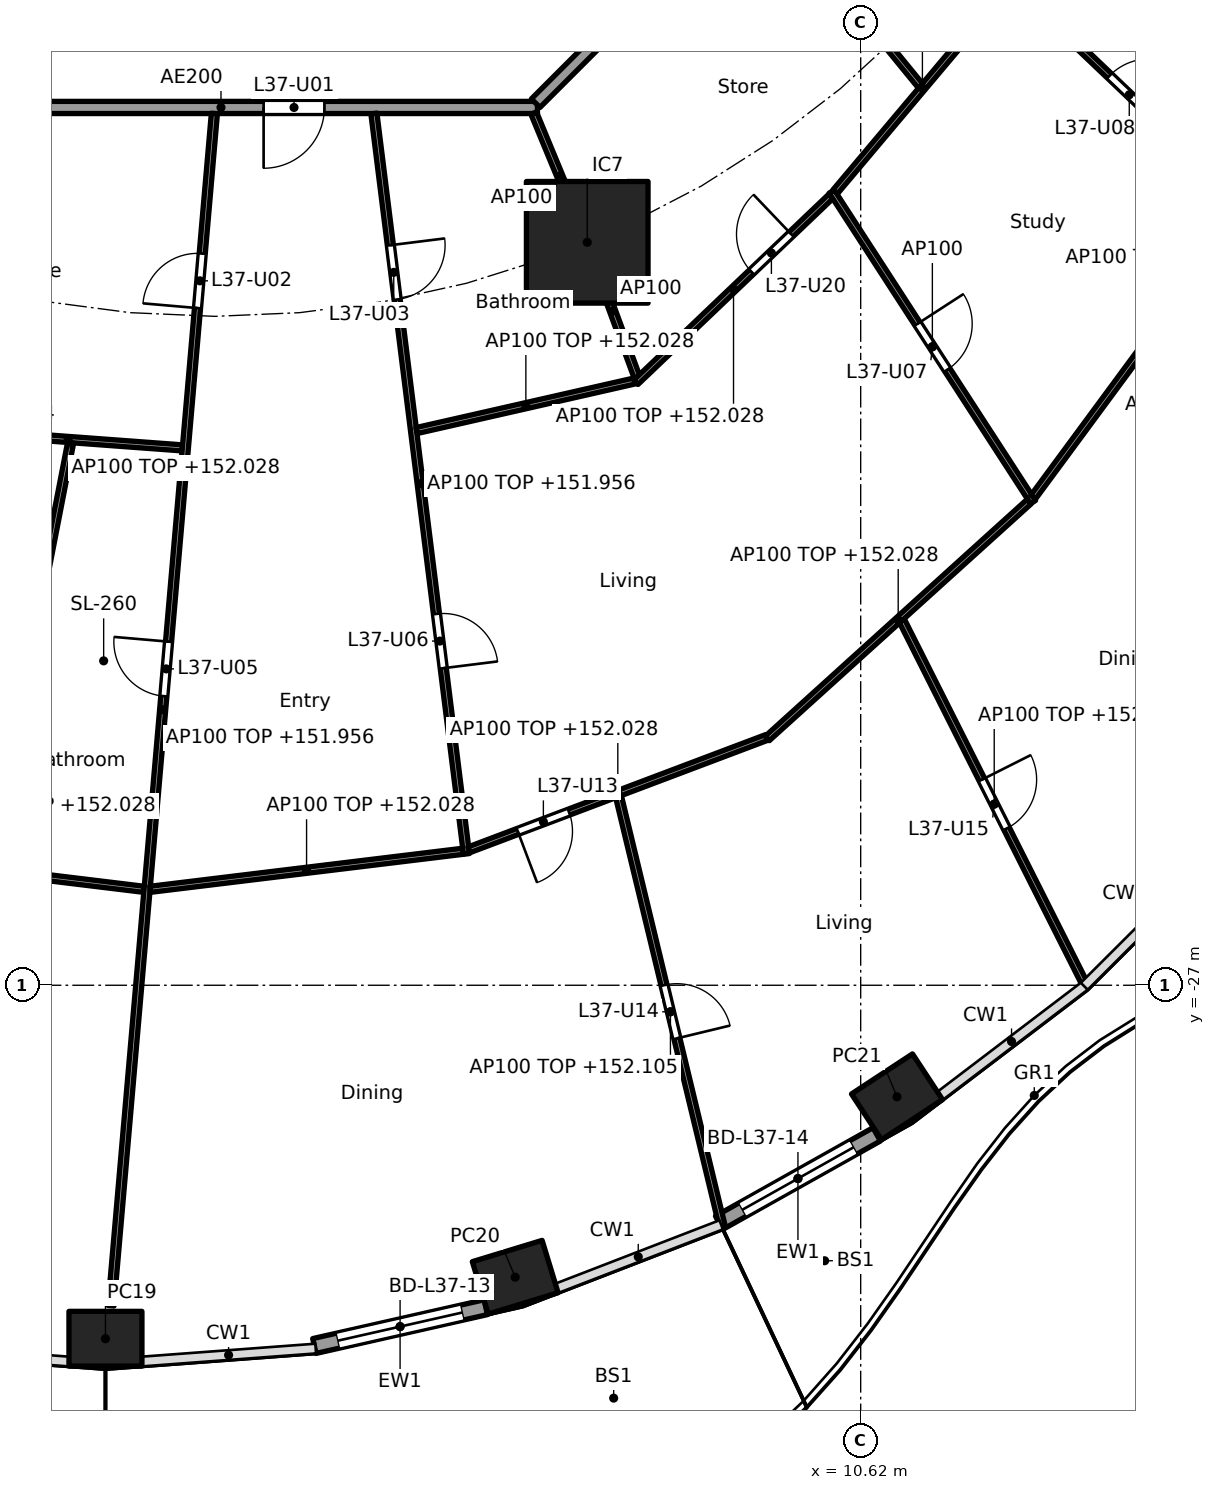
"""IFC4 building model, lengths in metres.
Left out: names, types, materials, properties, quantities, classifications, styles, units other than length and angle.
Written with IfcOpenShell. Run it as: python <this file> out.ifc"""

import sys

from ifc_helpers import new_model, si_unit, direction, frame, frame_2d, origin, origin_2d, place, context, subcontext, project, spatial, rectangle, hollow_rectangle, extrude, element, fill, save


model = new_model("IFC4")
c1 = context("Model", 3, precision=1e-05, world=origin(), true_north=direction((0.0, 1.0)))
c2 = subcontext(c1, "Body", "Model", "MODEL_VIEW")
j1 = project(units=[si_unit("LENGTHUNIT", "METRE"), si_unit("PLANEANGLEUNIT", "RADIAN")], contexts=[c1])
p1 = place(None, origin())
s1 = spatial("IfcSite", under=j1, at=p1, CompositionType="ELEMENT")
p2 = place(p1, origin())
s2 = spatial("IfcBuilding", under=s1, at=p2, CompositionType="ELEMENT")
p3 = place(p2, frame((0.0, 0.0, 149.2)))
s3 = spatial("IfcBuildingStorey", under=s2, at=p3, CompositionType="ELEMENT", Elevation=149.2)
for number, where, z_axis, x_axis in (
    (1, (-1.8, -32.813, 0.0), (0.0, 0.0, 1.0), (1.0, 0.0, 0.0)),
    (2, (4.938, -31.801, 0.0), (0.0, 0.0, 1.0), (0.957, 0.292, 0.0)),
    (3, (11.218, -28.834, 0.0), (0.0, 0.0, 1.0), (0.836, 0.549, 0.0)),
):
    element("IfcColumn", number, at=place(p3, frame(where, z_axis=z_axis, x_axis=x_axis)), inside=s3, PredefinedType="COLUMN", context=c2, shape_type="SweptSolid", body=[
        extrude(hollow_rectangle(XDim=1.2, YDim=0.9, WallThickness=0.04, at=origin_2d()), origin(), (0.0, 0.0, 1.0), 3.7),
    ])
p4 = place(p3, frame((6.123, -14.782, 0.0), z_axis=(0.0, 0.0, 1.0), x_axis=(1.0, 0.0, 0.0)))
e4 = element("IfcColumn", 4, at=p4, inside=s3, PredefinedType="COLUMN", context=c2, shape_type="SweptSolid", body=[
    extrude(rectangle(XDim=2.0, YDim=2.0, at=origin_2d()), origin(), (0.0, 0.0, 1.0), 3.7),
])
p5 = place(p3, frame((4.455, -32.294, 0.0), z_axis=(0.0, 0.0, 1.0), x_axis=(-0.975339035722, -0.220711951186, 0.0)))
e5 = element("IfcWall", 5, at=p5, inside=s3, PredefinedType="SOLIDWALL", context=c2, shape_type="SweptSolid", body=[
    extrude(rectangle(XDim=2.89, YDim=0.25, at=frame_2d((1.445, 0.0))), origin(), (0.0, 0.0, 1.0), 3.44),
])
p6 = place(p5, frame((0.395, 0.0, 0.0)))
e6 = element("IfcOpeningElement", 6, at=p6, cuts=e5, PredefinedType="OPENING", context=c2, shape_type="SweptSolid", body=[
    extrude(rectangle(XDim=2.1, YDim=2.4, at=frame_2d((1.05, 1.2))), frame((0.0, 0.135, 0.0), z_axis=(0.0, -1.0, 0.0), x_axis=(1.0, 0.0, 0.0)), (0.0, 0.0, 1.0), 0.27),
])
p7 = place(p3, frame((10.883, -29.452, 0.0), z_axis=(0.0, 0.0, 1.0), x_axis=(-0.87206688547, -0.489386705241, 0.0)))
e7 = element("IfcWall", 7, at=p7, inside=s3, PredefinedType="SOLIDWALL", context=c2, shape_type="SweptSolid", body=[
    extrude(rectangle(XDim=2.97, YDim=0.25, at=frame_2d((1.485, 0.0))), origin(), (0.0, 0.0, 1.0), 3.44),
])
p8 = place(p7, frame((0.435, 0.0, 0.0)))
e8 = element("IfcOpeningElement", 8, at=p8, cuts=e7, PredefinedType="OPENING", context=c2, shape_type="SweptSolid", body=[
    extrude(rectangle(XDim=2.1, YDim=2.4, at=frame_2d((1.05, 1.2))), frame((0.0, 0.135, 0.0), z_axis=(0.0, -1.0, 0.0), x_axis=(1.0, 0.0, 0.0)), (0.0, 0.0, 1.0), 0.27),
])
p9 = place(p3, frame((-5.104, -12.565, 0.0), z_axis=(0.0, 0.0, 1.0), x_axis=(1.0, 0.0, 0.0)))
e9 = element("IfcWall", 9, at=p9, inside=s3, PredefinedType="PARTITIONING", context=c2, shape_type="SweptSolid", body=[
    extrude(rectangle(XDim=10.409, YDim=0.2, at=frame_2d((5.205, 0.0))), origin(), (0.0, 0.0, 1.0), 3.44),
])
p10 = place(p9, frame((5.906, 0.0, 0.0)))
e10 = element("IfcOpeningElement", 10, at=p10, cuts=e9, PredefinedType="OPENING", context=c2, shape_type="SweptSolid", body=[
    extrude(rectangle(XDim=1.0, YDim=2.1, at=frame_2d((0.5, 1.05))), frame((0.0, 0.11, 0.0), z_axis=(0.0, -1.0, 0.0), x_axis=(1.0, 0.0, 0.0)), (0.0, 0.0, 1.0), 0.22),
])
p11 = place(p3, frame((5.275, -12.494, 0.0), z_axis=(0.0, 0.0, 1.0), x_axis=(0.707106781187, 0.707106781187, 0.0)))
e11 = element("IfcWall", 11, at=p11, inside=s3, PredefinedType="PARTITIONING", context=c2, shape_type="SweptSolid", body=[
    extrude(rectangle(XDim=10.409, YDim=0.2, at=frame_2d((5.205, 0.0))), origin(), (0.0, 0.0, 1.0), 3.44),
])
p12 = place(p3, frame((-4.29, -17.885, 0.0), z_axis=(0.0, 0.0, 1.0), x_axis=(0.997272353708, -0.073809569363, 0.0)))
e12 = element("IfcWall", 12, at=p12, inside=s3, PredefinedType="PARTITIONING", context=c2, shape_type="SweptSolid", body=[
    extrude(rectangle(XDim=3.764, YDim=0.1, at=frame_2d((1.882, 0.0))), origin(), (0.0, 0.0, 1.0), 2.828),
])
p13 = place(p12, frame((0.541, 0.0, 0.0)))
e13 = element("IfcOpeningElement", 13, at=p13, cuts=e12, PredefinedType="OPENING", context=c2, shape_type="SweptSolid", body=[
    extrude(rectangle(XDim=0.9, YDim=2.1, at=frame_2d((0.45, 1.05))), frame((0.0, 0.06, 0.0), z_axis=(0.0, -1.0, 0.0), x_axis=(1.0, 0.0, 0.0)), (0.0, 0.0, 1.0), 0.12),
])
p14 = place(p3, frame((-6.313, -24.797, 0.0), z_axis=(0.0, 0.0, 1.0), x_axis=(0.992692993044, -0.120667400577, 0.0)))
e14 = element("IfcWall", 14, at=p14, inside=s3, PredefinedType="PARTITIONING", context=c2, shape_type="SweptSolid", body=[
    extrude(rectangle(XDim=5.186, YDim=0.1, at=frame_2d((2.593, 0.0))), origin(), (0.0, 0.0, 1.0), 2.828),
])
p15 = place(p3, frame((-2.373, -18.077, 0.0), z_axis=(0.0, 0.0, 1.0), x_axis=(-0.190800770119, -0.98162878224, 0.0)))
e15 = element("IfcWall", 15, at=p15, inside=s3, PredefinedType="PARTITIONING", context=c2, shape_type="SweptSolid", body=[
    extrude(rectangle(XDim=7.114, YDim=0.1, at=frame_2d((3.557, 0.0))), origin(), (0.0, 0.0, 1.0), 3.44),
])
p16 = place(p3, frame((-0.009, -12.664, 0.0), z_axis=(0.0, 0.0, 1.0), x_axis=(-0.086431005932, -0.996257838721, 0.0)))
e16 = element("IfcWall", 16, at=p16, inside=s3, PredefinedType="PARTITIONING", context=c2, shape_type="SweptSolid", body=[
    extrude(rectangle(XDim=19.68, YDim=0.1, at=frame_2d((9.84, 0.0))), origin(), (0.0, 0.0, 1.0), 2.756),
])
p17 = place(p16, frame((2.312, 0.0, 0.0)))
e17 = element("IfcOpeningElement", 17, at=p17, cuts=e16, PredefinedType="OPENING", context=c2, shape_type="SweptSolid", body=[
    extrude(rectangle(XDim=0.9, YDim=2.1, at=frame_2d((0.45, 1.05))), frame((0.0, 0.06, 0.0), z_axis=(0.0, -1.0, 0.0), x_axis=(1.0, 0.0, 0.0)), (0.0, 0.0, 1.0), 0.12),
])
p18 = place(p16, frame((8.718, 0.0, 0.0)))
e18 = element("IfcOpeningElement", 18, at=p18, cuts=e16, PredefinedType="OPENING", context=c2, shape_type="SweptSolid", body=[
    extrude(rectangle(XDim=0.9, YDim=2.1, at=frame_2d((0.45, 1.05))), frame((0.0, 0.06, 0.0), z_axis=(0.0, -1.0, 0.0), x_axis=(1.0, 0.0, 0.0)), (0.0, 0.0, 1.0), 0.12),
])
p19 = place(p3, frame((-1.066, -25.422, 0.0), z_axis=(0.0, 0.0, 1.0), x_axis=(0.992692993044, 0.120667400577, 0.0)))
e19 = element("IfcWall", 19, at=p19, inside=s3, PredefinedType="PARTITIONING", context=c2, shape_type="SweptSolid", body=[
    extrude(rectangle(XDim=5.186, YDim=0.1, at=frame_2d((2.593, 0.0))), origin(), (0.0, 0.0, 1.0), 2.828),
])
p20 = place(p3, frame((2.615, -12.664, 0.0), z_axis=(0.0, 0.0, 1.0), x_axis=(0.124051875784, -0.992275733914, 0.0)))
e20 = element("IfcWall", 20, at=p20, inside=s3, PredefinedType="PARTITIONING", context=c2, shape_type="SweptSolid", body=[
    extrude(rectangle(XDim=12.271, YDim=0.1, at=frame_2d((6.135, 0.0))), origin(), (0.0, 0.0, 1.0), 2.756),
])
p21 = place(p20, frame((2.183, 0.0, 0.0)))
e21 = element("IfcOpeningElement", 21, at=p21, cuts=e20, PredefinedType="OPENING", context=c2, shape_type="SweptSolid", body=[
    extrude(rectangle(XDim=0.9, YDim=2.1, at=frame_2d((0.45, 1.05))), frame((0.0, 0.06, 0.0), z_axis=(0.0, -1.0, 0.0), x_axis=(1.0, 0.0, 0.0)), (0.0, 0.0, 1.0), 0.12),
])
p22 = place(p20, frame((8.293, 0.0, 0.0)))
e22 = element("IfcOpeningElement", 22, at=p22, cuts=e20, PredefinedType="OPENING", context=c2, shape_type="SweptSolid", body=[
    extrude(rectangle(XDim=0.9, YDim=2.1, at=frame_2d((0.45, 1.05))), frame((0.0, 0.06, 0.0), z_axis=(0.0, -1.0, 0.0), x_axis=(1.0, 0.0, 0.0)), (0.0, 0.0, 1.0), 0.12),
])
p23 = place(p3, frame((3.317, -17.878, 0.0), z_axis=(0.0, 0.0, 1.0), x_axis=(0.975099660451, 0.221767112505, 0.0)))
e23 = element("IfcWall", 23, at=p23, inside=s3, PredefinedType="PARTITIONING", context=c2, shape_type="SweptSolid", body=[
    extrude(rectangle(XDim=3.686, YDim=0.1, at=frame_2d((1.843, 0.0))), origin(), (0.0, 0.0, 1.0), 2.828),
])
p24 = place(p3, frame((4.178, -24.773, 0.0), z_axis=(0.0, 0.0, 1.0), x_axis=(0.935585145124, 0.353101169955, 0.0)))
e24 = element("IfcWall", 24, at=p24, inside=s3, PredefinedType="PARTITIONING", context=c2, shape_type="SweptSolid", body=[
    extrude(rectangle(XDim=5.233, YDim=0.1, at=frame_2d((2.617, 0.0))), origin(), (0.0, 0.0, 1.0), 2.828),
])
p25 = place(p24, frame((0.858, 0.0, 0.0)))
e25 = element("IfcOpeningElement", 25, at=p25, cuts=e24, PredefinedType="OPENING", context=c2, shape_type="SweptSolid", body=[
    extrude(rectangle(XDim=0.9, YDim=2.1, at=frame_2d((0.45, 1.05))), frame((0.0, 0.06, 0.0), z_axis=(0.0, -1.0, 0.0), x_axis=(1.0, 0.0, 0.0)), (0.0, 0.0, 1.0), 0.12),
])
p26 = place(p3, frame((6.638, -23.897, 0.0), z_axis=(0.0, 0.0, 1.0), x_axis=(0.23451925277, -0.97211147513, 0.0)))
e26 = element("IfcWall", 26, at=p26, inside=s3, PredefinedType="PARTITIONING", context=c2, shape_type="SweptSolid", body=[
    extrude(rectangle(XDim=7.281, YDim=0.1, at=frame_2d((3.641, 0.0))), origin(), (0.0, 0.0, 1.0), 2.905),
])
p27 = place(p26, frame((3.19, 0.0, 0.0)))
e27 = element("IfcOpeningElement", 27, at=p27, cuts=e26, PredefinedType="OPENING", context=c2, shape_type="SweptSolid", body=[
    extrude(rectangle(XDim=0.9, YDim=2.1, at=frame_2d((0.45, 1.05))), frame((0.0, 0.06, 0.0), z_axis=(0.0, -1.0, 0.0), x_axis=(1.0, 0.0, 0.0)), (0.0, 0.0, 1.0), 0.12),
])
p28 = place(p3, frame((5.243, -12.657, 0.0), z_axis=(0.0, 0.0, 1.0), x_axis=(0.382703272338, -0.923871314276, 0.0)))
e28 = element("IfcWall", 28, at=p28, inside=s3, PredefinedType="PARTITIONING", context=c2, shape_type="SweptSolid", body=[
    extrude(rectangle(XDim=2.249, YDim=0.1, at=frame_2d((1.125, 0.0))), origin(), (0.0, 0.0, 1.0), 3.44),
])
p29 = place(p3, frame((6.14, -14.829, 0.0), z_axis=(0.0, 0.0, 1.0), x_axis=(0.346198576881, -0.938161257655, 0.0)))
e29 = element("IfcWall", 29, at=p29, inside=s3, PredefinedType="PARTITIONING", context=c2, shape_type="SweptSolid", body=[
    extrude(rectangle(XDim=2.317, YDim=0.1, at=frame_2d((1.158, 0.0))), origin(), (0.0, 0.0, 1.0), 3.44),
])
p30 = place(p3, frame((6.923, -17.084, 0.0), z_axis=(0.0, 0.0, 1.0), x_axis=(0.723719008606, 0.690094773623, 0.0)))
e30 = element("IfcWall", 30, at=p30, inside=s3, PredefinedType="PARTITIONING", context=c2, shape_type="SweptSolid", body=[
    extrude(rectangle(XDim=4.436, YDim=0.1, at=frame_2d((2.218, 0.0))), origin(), (0.0, 0.0, 1.0), 2.828),
])
p31 = place(p30, frame((2.629, 0.0, 0.0)))
e31 = element("IfcOpeningElement", 31, at=p31, cuts=e30, PredefinedType="OPENING", context=c2, shape_type="SweptSolid", body=[
    extrude(rectangle(XDim=0.9, YDim=2.1, at=frame_2d((0.45, 1.05))), frame((0.0, 0.06, 0.0), z_axis=(0.0, -1.0, 0.0), x_axis=(1.0, 0.0, 0.0)), (0.0, 0.0, 1.0), 0.12),
])
p32 = place(p3, frame((9.084, -22.941, 0.0), z_axis=(0.0, 0.0, 1.0), x_axis=(0.741684187175, 0.670749257543, 0.0)))
e32 = element("IfcWall", 32, at=p32, inside=s3, PredefinedType="PARTITIONING", context=c2, shape_type="SweptSolid", body=[
    extrude(rectangle(XDim=5.806, YDim=0.1, at=frame_2d((2.903, 0.0))), origin(), (0.0, 0.0, 1.0), 2.828),
])
p33 = place(p3, frame((11.296, -21.005, 0.0), z_axis=(0.0, 0.0, 1.0), x_axis=(0.44991509116, -0.893071335755, 0.0)))
e33 = element("IfcWall", 33, at=p33, inside=s3, PredefinedType="PARTITIONING", context=c2, shape_type="SweptSolid", body=[
    extrude(rectangle(XDim=6.755, YDim=0.1, at=frame_2d((3.377, 0.0))), origin(), (0.0, 0.0, 1.0), 2.905),
])
p34 = place(p33, frame((2.927, 0.0, 0.0)))
e34 = element("IfcOpeningElement", 34, at=p34, cuts=e33, PredefinedType="OPENING", context=c2, shape_type="SweptSolid", body=[
    extrude(rectangle(XDim=0.9, YDim=2.1, at=frame_2d((0.45, 1.05))), frame((0.0, 0.06, 0.0), z_axis=(0.0, -1.0, 0.0), x_axis=(1.0, 0.0, 0.0)), (0.0, 0.0, 1.0), 0.12),
])
p35 = place(p3, frame((10.143, -13.946, 0.0), z_axis=(0.0, 0.0, 1.0), x_axis=(0.543872968754, -0.839167560061, 0.0)))
e35 = element("IfcWall", 35, at=p35, inside=s3, PredefinedType="PARTITIONING", context=c2, shape_type="SweptSolid", body=[
    extrude(rectangle(XDim=6.088, YDim=0.1, at=frame_2d((3.044, 0.0))), origin(), (0.0, 0.0, 1.0), 3.44),
])
p36 = place(p35, frame((2.594, 0.0, 0.0)))
e36 = element("IfcOpeningElement", 36, at=p36, cuts=e35, PredefinedType="OPENING", context=c2, shape_type="SweptSolid", body=[
    extrude(rectangle(XDim=0.9, YDim=2.1, at=frame_2d((0.45, 1.05))), frame((0.0, 0.06, 0.0), z_axis=(0.0, -1.0, 0.0), x_axis=(1.0, 0.0, 0.0)), (0.0, 0.0, 1.0), 0.12),
])
p37 = place(p3, frame((10.202, -13.95, 0.0), z_axis=(0.0, 0.0, 1.0), x_axis=(0.644068144287, 0.764968120587, 0.0)))
e37 = element("IfcWall", 37, at=p37, inside=s3, PredefinedType="PARTITIONING", context=c2, shape_type="SweptSolid", body=[
    extrude(rectangle(XDim=4.449, YDim=0.1, at=frame_2d((2.224, 0.0))), origin(), (0.0, 0.0, 1.0), 2.828),
])
p38 = place(p3, frame((13.457, -18.973, 0.0), z_axis=(0.0, 0.0, 1.0), x_axis=(0.593532053206, 0.80481035146, 0.0)))
e38 = element("IfcWall", 38, at=p38, inside=s3, PredefinedType="PARTITIONING", context=c2, shape_type="SweptSolid", body=[
    extrude(rectangle(XDim=5.876, YDim=0.1, at=frame_2d((2.938, 0.0))), origin(), (0.0, 0.0, 1.0), 2.828),
])
p39 = place(p3, frame((8.948, -8.962, 0.0), z_axis=(0.0, 0.0, 1.0), x_axis=(0.633041272858, -0.774118044524, 0.0)))
e39 = element("IfcWall", 39, at=p39, inside=s3, PredefinedType="PARTITIONING", context=c2, shape_type="SweptSolid", body=[
    extrude(rectangle(XDim=4.195, YDim=0.1, at=frame_2d((2.097, 0.0))), origin(), (0.0, 0.0, 1.0), 2.756),
])
p40 = place(p3, frame((13.064, -10.474, 0.0), z_axis=(0.0, 0.0, 1.0), x_axis=(0.723627371706, -0.690190862673, 0.0)))
e40 = element("IfcWall", 40, at=p40, inside=s3, PredefinedType="PARTITIONING", context=c2, shape_type="SweptSolid", body=[
    extrude(rectangle(XDim=10.193, YDim=0.1, at=frame_2d((5.097, 0.0))), origin(), (0.0, 0.0, 1.0), 2.828),
])
p41 = place(p40, frame((2.277, 0.0, 0.0)))
e41 = element("IfcOpeningElement", 41, at=p41, cuts=e40, PredefinedType="OPENING", context=c2, shape_type="SweptSolid", body=[
    extrude(rectangle(XDim=0.9, YDim=2.1, at=frame_2d((0.45, 1.05))), frame((0.0, 0.06, 0.0), z_axis=(0.0, -1.0, 0.0), x_axis=(1.0, 0.0, 0.0)), (0.0, 0.0, 1.0), 0.12),
])
p42 = place(p40, frame((7.348, 0.0, 0.0)))
e42 = element("IfcOpeningElement", 42, at=p42, cuts=e40, PredefinedType="OPENING", context=c2, shape_type="SweptSolid", body=[
    extrude(rectangle(XDim=0.9, YDim=2.1, at=frame_2d((0.45, 1.05))), frame((0.0, 0.06, 0.0), z_axis=(0.0, -1.0, 0.0), x_axis=(1.0, 0.0, 0.0)), (0.0, 0.0, 1.0), 0.12),
])
p43 = place(p6, origin())
e43 = element("IfcDoor", 43, at=p43, inside=s3, OperationType="SLIDING_TO_LEFT", PredefinedType="DOOR", context=c2, shape_type="SweptSolid", body=[
    extrude(rectangle(XDim=2.1, YDim=2.4, at=frame_2d((1.05, 1.2))), frame((0.0, 0.025, 0.0), z_axis=(0.0, -1.0, 0.0), x_axis=(1.0, 0.0, 0.0)), (0.0, 0.0, 1.0), 0.05),
])
fill(e6, e43)
p44 = place(p8, origin())
e44 = element("IfcDoor", 44, at=p44, inside=s3, OperationType="SLIDING_TO_LEFT", PredefinedType="DOOR", context=c2, shape_type="SweptSolid", body=[
    extrude(rectangle(XDim=2.1, YDim=2.4, at=frame_2d((1.05, 1.2))), frame((0.0, 0.025, 0.0), z_axis=(0.0, -1.0, 0.0), x_axis=(1.0, 0.0, 0.0)), (0.0, 0.0, 1.0), 0.05),
])
fill(e8, e44)
p45 = place(p10, frame((1.0, 0.0, 0.0), x_axis=(-1.0, 0.0, 0.0)))
e45 = element("IfcDoor", 45, at=p45, inside=s3, OperationType="SINGLE_SWING_RIGHT", PredefinedType="DOOR", context=c2, shape_type="SweptSolid", body=[
    extrude(rectangle(XDim=1.0, YDim=2.1, at=frame_2d((0.5, 1.05))), frame((0.0, 0.025, 0.0), z_axis=(0.0, -1.0, 0.0), x_axis=(1.0, 0.0, 0.0)), (0.0, 0.0, 1.0), 0.05),
])
fill(e10, e45)
p46 = place(p17, frame((0.9, 0.0, 0.0), x_axis=(-1.0, 0.0, 0.0)))
e46 = element("IfcDoor", 46, at=p46, inside=s3, OperationType="SINGLE_SWING_LEFT", PredefinedType="DOOR", context=c2, shape_type="SweptSolid", body=[
    extrude(rectangle(XDim=0.9, YDim=2.1, at=frame_2d((0.45, 1.05))), frame((0.0, 0.025, 0.0), z_axis=(0.0, -1.0, 0.0), x_axis=(1.0, 0.0, 0.0)), (0.0, 0.0, 1.0), 0.05),
])
fill(e17, e46)
p47 = place(p21, origin())
e47 = element("IfcDoor", 47, at=p47, inside=s3, OperationType="SINGLE_SWING_LEFT", PredefinedType="DOOR", context=c2, shape_type="SweptSolid", body=[
    extrude(rectangle(XDim=0.9, YDim=2.1, at=frame_2d((0.45, 1.05))), frame((0.0, 0.025, 0.0), z_axis=(0.0, -1.0, 0.0), x_axis=(1.0, 0.0, 0.0)), (0.0, 0.0, 1.0), 0.05),
])
fill(e21, e47)
p48 = place(p18, frame((0.9, 0.0, 0.0), x_axis=(-1.0, 0.0, 0.0)))
e48 = element("IfcDoor", 48, at=p48, inside=s3, OperationType="SINGLE_SWING_RIGHT", PredefinedType="DOOR", context=c2, shape_type="SweptSolid", body=[
    extrude(rectangle(XDim=0.9, YDim=2.1, at=frame_2d((0.45, 1.05))), frame((0.0, 0.025, 0.0), z_axis=(0.0, -1.0, 0.0), x_axis=(1.0, 0.0, 0.0)), (0.0, 0.0, 1.0), 0.05),
])
fill(e18, e48)
p49 = place(p22, origin())
e49 = element("IfcDoor", 49, at=p49, inside=s3, OperationType="SINGLE_SWING_RIGHT", PredefinedType="DOOR", context=c2, shape_type="SweptSolid", body=[
    extrude(rectangle(XDim=0.9, YDim=2.1, at=frame_2d((0.45, 1.05))), frame((0.0, 0.025, 0.0), z_axis=(0.0, -1.0, 0.0), x_axis=(1.0, 0.0, 0.0)), (0.0, 0.0, 1.0), 0.05),
])
fill(e22, e49)
p50 = place(p36, origin())
e50 = element("IfcDoor", 50, at=p50, inside=s3, OperationType="SINGLE_SWING_LEFT", PredefinedType="DOOR", context=c2, shape_type="SweptSolid", body=[
    extrude(rectangle(XDim=0.9, YDim=2.1, at=frame_2d((0.45, 1.05))), frame((0.0, 0.025, 0.0), z_axis=(0.0, -1.0, 0.0), x_axis=(1.0, 0.0, 0.0)), (0.0, 0.0, 1.0), 0.05),
])
fill(e36, e50)
p51 = place(p41, origin())
e51 = element("IfcDoor", 51, at=p51, inside=s3, OperationType="SINGLE_SWING_RIGHT", PredefinedType="DOOR", context=c2, shape_type="SweptSolid", body=[
    extrude(rectangle(XDim=0.9, YDim=2.1, at=frame_2d((0.45, 1.05))), frame((0.0, 0.025, 0.0), z_axis=(0.0, -1.0, 0.0), x_axis=(1.0, 0.0, 0.0)), (0.0, 0.0, 1.0), 0.05),
])
fill(e41, e51)
p52 = place(p25, frame((0.9, 0.0, 0.0), x_axis=(-1.0, 0.0, 0.0)))
e52 = element("IfcDoor", 52, at=p52, inside=s3, OperationType="SINGLE_SWING_RIGHT", PredefinedType="DOOR", context=c2, shape_type="SweptSolid", body=[
    extrude(rectangle(XDim=0.9, YDim=2.1, at=frame_2d((0.45, 1.05))), frame((0.0, 0.025, 0.0), z_axis=(0.0, -1.0, 0.0), x_axis=(1.0, 0.0, 0.0)), (0.0, 0.0, 1.0), 0.05),
])
fill(e25, e52)
p53 = place(p27, origin())
e53 = element("IfcDoor", 53, at=p53, inside=s3, OperationType="SINGLE_SWING_RIGHT", PredefinedType="DOOR", context=c2, shape_type="SweptSolid", body=[
    extrude(rectangle(XDim=0.9, YDim=2.1, at=frame_2d((0.45, 1.05))), frame((0.0, 0.025, 0.0), z_axis=(0.0, -1.0, 0.0), x_axis=(1.0, 0.0, 0.0)), (0.0, 0.0, 1.0), 0.05),
])
fill(e27, e53)
p54 = place(p34, origin())
e54 = element("IfcDoor", 54, at=p54, inside=s3, OperationType="SINGLE_SWING_LEFT", PredefinedType="DOOR", context=c2, shape_type="SweptSolid", body=[
    extrude(rectangle(XDim=0.9, YDim=2.1, at=frame_2d((0.45, 1.05))), frame((0.0, 0.025, 0.0), z_axis=(0.0, -1.0, 0.0), x_axis=(1.0, 0.0, 0.0)), (0.0, 0.0, 1.0), 0.05),
])
fill(e34, e54)
p55 = place(p31, origin())
e55 = element("IfcDoor", 55, at=p55, inside=s3, OperationType="SINGLE_SWING_RIGHT", PredefinedType="DOOR", context=c2, shape_type="SweptSolid", body=[
    extrude(rectangle(XDim=0.9, YDim=2.1, at=frame_2d((0.45, 1.05))), frame((0.0, 0.025, 0.0), z_axis=(0.0, -1.0, 0.0), x_axis=(1.0, 0.0, 0.0)), (0.0, 0.0, 1.0), 0.05),
])
fill(e31, e55)
save(model, sys.argv[1])
